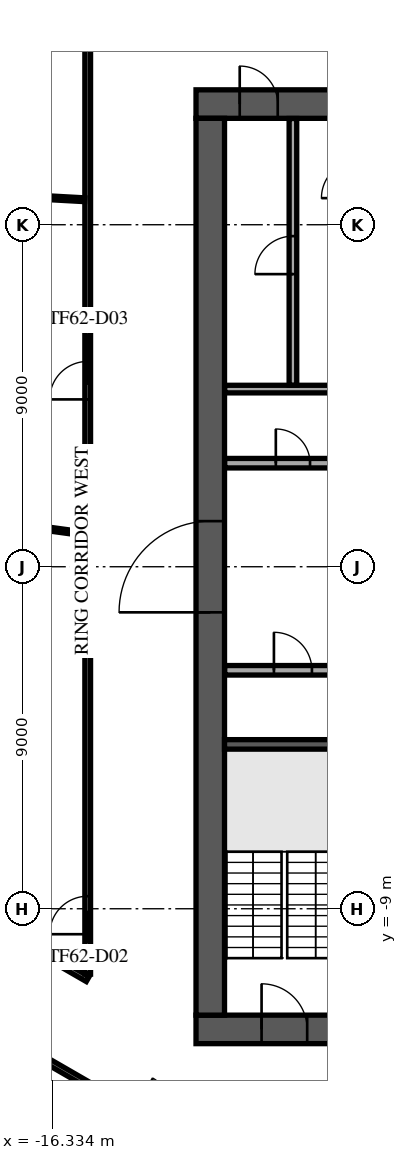
"""IFC4 building model, lengths in metres.
Left out: names, types, materials, properties, quantities, classifications, styles, units other than length and angle.
Written with IfcOpenShell. Run it as: python <this file> out.ifc"""

import sys

from ifc_helpers import new_model, si_unit, direction, frame, frame_2d, origin, place, context, subcontext, project, spatial, rectangle, extrude, element, fill, save


model = new_model("IFC4")
c1 = context("Model", 3, precision=1e-05, world=origin(), true_north=direction((0.0, 1.0)))
c2 = subcontext(c1, "Body", "Model", "MODEL_VIEW")
j1 = project(units=[si_unit("LENGTHUNIT", "METRE"), si_unit("PLANEANGLEUNIT", "RADIAN")], contexts=[c1])
p1 = place(None, origin())
s1 = spatial("IfcSite", under=j1, at=p1, CompositionType="ELEMENT")
p2 = place(p1, origin())
s2 = spatial("IfcBuilding", under=s1, at=p2, CompositionType="ELEMENT")
p3 = place(p2, frame((0.0, 0.0, 262.9)))
s3 = spatial("IfcBuildingStorey", under=s2, at=p3, CompositionType="ELEMENT", Elevation=262.9)
p4 = place(p3, frame((-12.55, 12.175, 0.0), z_axis=(0.0, 0.0, 1.0), x_axis=(1.0, 0.0, 0.0)))
e1 = element("IfcWall", 1, at=p4, inside=s3, PredefinedType="SHEAR", context=c2, shape_type="SweptSolid", body=[
    extrude(rectangle(XDim=25.1, YDim=0.75, at=frame_2d((12.55, 0.0))), origin(), (0.0, 0.0, 1.0), 3.64),
])
p5 = place(p4, frame((11.35, 0.0, 0.0)))
e2 = element("IfcOpeningElement", 2, at=p5, cuts=e1, PredefinedType="OPENING", context=c2, shape_type="SweptSolid", body=[
    extrude(rectangle(XDim=2.4, YDim=2.4, at=frame_2d((1.2, 1.2))), frame((0.0, 0.385, 0.0), z_axis=(0.0, -1.0, 0.0), x_axis=(1.0, 0.0, 0.0)), (0.0, 0.0, 1.0), 0.77),
])
p6 = place(p4, frame((22.175, 0.0, 0.0)))
e3 = element("IfcOpeningElement", 3, at=p6, cuts=e1, PredefinedType="OPENING", context=c2, shape_type="SweptSolid", body=[
    extrude(rectangle(XDim=1.2, YDim=2.1, at=frame_2d((0.6, 1.05))), frame((0.0, 0.385, 0.0), z_axis=(0.0, -1.0, 0.0), x_axis=(1.0, 0.0, 0.0)), (0.0, 0.0, 1.0), 0.77),
])
p7 = place(p4, frame((1.15, 0.0, 0.0)))
e4 = element("IfcOpeningElement", 4, at=p7, cuts=e1, PredefinedType="OPENING", context=c2, shape_type="SweptSolid", body=[
    extrude(rectangle(XDim=1.0, YDim=2.1, at=frame_2d((0.5, 1.05))), frame((0.0, 0.385, 0.0), z_axis=(0.0, -1.0, 0.0), x_axis=(1.0, 0.0, 0.0)), (0.0, 0.0, 1.0), 0.77),
])
p8 = place(p3, frame((-12.55, -12.175, 0.0), z_axis=(0.0, 0.0, 1.0), x_axis=(1.0, 0.0, 0.0)))
e5 = element("IfcWall", 5, at=p8, inside=s3, PredefinedType="SHEAR", context=c2, shape_type="SweptSolid", body=[
    extrude(rectangle(XDim=25.1, YDim=0.75, at=frame_2d((12.55, 0.0))), origin(), (0.0, 0.0, 1.0), 3.64),
])
p9 = place(p8, frame((7.45, 0.0, 0.0)))
e6 = element("IfcOpeningElement", 6, at=p9, cuts=e5, PredefinedType="OPENING", context=c2, shape_type="SweptSolid", body=[
    extrude(rectangle(XDim=2.0, YDim=2.1, at=frame_2d((1.0, 1.05))), frame((0.0, 0.385, 0.0), z_axis=(0.0, -1.0, 0.0), x_axis=(1.0, 0.0, 0.0)), (0.0, 0.0, 1.0), 0.77),
])
p10 = place(p8, frame((17.575, 0.0, 0.0)))
e7 = element("IfcOpeningElement", 7, at=p10, cuts=e5, PredefinedType="OPENING", context=c2, shape_type="SweptSolid", body=[
    extrude(rectangle(XDim=1.2, YDim=2.1, at=frame_2d((0.6, 1.05))), frame((0.0, 0.385, 0.0), z_axis=(0.0, -1.0, 0.0), x_axis=(1.0, 0.0, 0.0)), (0.0, 0.0, 1.0), 0.77),
])
p11 = place(p8, frame((1.725, 0.0, 0.0)))
e8 = element("IfcOpeningElement", 8, at=p11, cuts=e5, PredefinedType="OPENING", context=c2, shape_type="SweptSolid", body=[
    extrude(rectangle(XDim=1.2, YDim=2.1, at=frame_2d((0.6, 1.05))), frame((0.0, 0.385, 0.0), z_axis=(0.0, -1.0, 0.0), x_axis=(1.0, 0.0, 0.0)), (0.0, 0.0, 1.0), 0.77),
])
p12 = place(p8, frame((22.175, 0.0, 0.0)))
e9 = element("IfcOpeningElement", 9, at=p12, cuts=e5, PredefinedType="OPENING", context=c2, shape_type="SweptSolid", body=[
    extrude(rectangle(XDim=1.2, YDim=2.1, at=frame_2d((0.6, 1.05))), frame((0.0, 0.385, 0.0), z_axis=(0.0, -1.0, 0.0), x_axis=(1.0, 0.0, 0.0)), (0.0, 0.0, 1.0), 0.77),
])
p13 = place(p3, frame((-12.175, -11.8, 0.0), z_axis=(0.0, 0.0, 1.0), x_axis=(0.0, 1.0, 0.0)))
e10 = element("IfcWall", 10, at=p13, inside=s3, PredefinedType="SHEAR", context=c2, shape_type="SweptSolid", body=[
    extrude(rectangle(XDim=23.6, YDim=0.75, at=frame_2d((11.8, 0.0))), origin(), (0.0, 0.0, 1.0), 3.64),
])
p14 = place(p13, frame((10.6, 0.0, 0.0)))
e11 = element("IfcOpeningElement", 11, at=p14, cuts=e10, PredefinedType="OPENING", context=c2, shape_type="SweptSolid", body=[
    extrude(rectangle(XDim=2.4, YDim=2.4, at=frame_2d((1.2, 1.2))), frame((0.0, 0.385, 0.0), z_axis=(0.0, -1.0, 0.0), x_axis=(1.0, 0.0, 0.0)), (0.0, 0.0, 1.0), 0.77),
])
p15 = place(p3, frame((-8.65, -4.675, 0.0), z_axis=(0.0, 0.0, 1.0), x_axis=(-1.0, 0.0, 0.0)))
e12 = element("IfcWall", 12, at=p15, inside=s3, PredefinedType="SOLIDWALL", context=c2, shape_type="SweptSolid", body=[
    extrude(rectangle(XDim=3.15, YDim=0.25, at=frame_2d((1.575, 0.0))), origin(), (0.0, 0.0, 1.0), 3.64),
])
p16 = place(p3, frame((-11.795, -2.725, 0.0), z_axis=(0.0, 0.0, 1.0), x_axis=(1.0, 0.0, 0.0)))
e13 = element("IfcWall", 13, at=p16, inside=s3, PredefinedType="PARTITIONING", context=c2, shape_type="SweptSolid", body=[
    extrude(rectangle(XDim=14.415, YDim=0.25, at=frame_2d((7.208, 0.0))), origin(), (0.0, 0.0, 1.0), 3.64),
])
p17 = place(p16, frame((1.295, 0.0, 0.0)))
e14 = element("IfcOpeningElement", 14, at=p17, cuts=e13, PredefinedType="OPENING", context=c2, shape_type="SweptSolid", body=[
    extrude(rectangle(XDim=1.0, YDim=2.1, at=frame_2d((0.5, 1.05))), frame((0.0, 0.135, 0.0), z_axis=(0.0, -1.0, 0.0), x_axis=(1.0, 0.0, 0.0)), (0.0, 0.0, 1.0), 0.27),
])
p18 = place(p16, frame((4.42, 0.0, 0.0)))
e15 = element("IfcOpeningElement", 15, at=p18, cuts=e13, PredefinedType="OPENING", context=c2, shape_type="SweptSolid", body=[
    extrude(rectangle(XDim=1.0, YDim=2.1, at=frame_2d((0.5, 1.05))), frame((0.0, 0.135, 0.0), z_axis=(0.0, -1.0, 0.0), x_axis=(1.0, 0.0, 0.0)), (0.0, 0.0, 1.0), 0.27),
])
p19 = place(p16, frame((9.92, 0.0, 0.0)))
e16 = element("IfcOpeningElement", 16, at=p19, cuts=e13, PredefinedType="OPENING", context=c2, shape_type="SweptSolid", body=[
    extrude(rectangle(XDim=1.0, YDim=2.1, at=frame_2d((0.5, 1.05))), frame((0.0, 0.135, 0.0), z_axis=(0.0, -1.0, 0.0), x_axis=(1.0, 0.0, 0.0)), (0.0, 0.0, 1.0), 0.27),
])
p20 = place(p3, frame((-11.795, 2.725, 0.0), z_axis=(0.0, 0.0, 1.0), x_axis=(1.0, 0.0, 0.0)))
e17 = element("IfcWall", 17, at=p20, inside=s3, PredefinedType="PARTITIONING", context=c2, shape_type="SweptSolid", body=[
    extrude(rectangle(XDim=23.59, YDim=0.25, at=frame_2d((11.795, 0.0))), origin(), (0.0, 0.0, 1.0), 3.64),
])
p21 = place(p20, frame((21.345, 0.0, 0.0)))
e18 = element("IfcOpeningElement", 18, at=p21, cuts=e17, PredefinedType="OPENING", context=c2, shape_type="SweptSolid", body=[
    extrude(rectangle(XDim=0.9, YDim=2.1, at=frame_2d((0.45, 1.05))), frame((0.0, 0.135, 0.0), z_axis=(0.0, -1.0, 0.0), x_axis=(1.0, 0.0, 0.0)), (0.0, 0.0, 1.0), 0.27),
])
p22 = place(p20, frame((1.345, 0.0, 0.0)))
e19 = element("IfcOpeningElement", 19, at=p22, cuts=e17, PredefinedType="OPENING", context=c2, shape_type="SweptSolid", body=[
    extrude(rectangle(XDim=0.9, YDim=2.1, at=frame_2d((0.45, 1.05))), frame((0.0, 0.135, 0.0), z_axis=(0.0, -1.0, 0.0), x_axis=(1.0, 0.0, 0.0)), (0.0, 0.0, 1.0), 0.27),
])
p23 = place(p20, frame((4.42, 0.0, 0.0)))
e20 = element("IfcOpeningElement", 20, at=p23, cuts=e17, PredefinedType="OPENING", context=c2, shape_type="SweptSolid", body=[
    extrude(rectangle(XDim=1.0, YDim=2.1, at=frame_2d((0.5, 1.05))), frame((0.0, 0.135, 0.0), z_axis=(0.0, -1.0, 0.0), x_axis=(1.0, 0.0, 0.0)), (0.0, 0.0, 1.0), 0.27),
])
p24 = place(p20, frame((9.82, 0.0, 0.0)))
e21 = element("IfcOpeningElement", 21, at=p24, cuts=e17, PredefinedType="OPENING", context=c2, shape_type="SweptSolid", body=[
    extrude(rectangle(XDim=1.2, YDim=2.1, at=frame_2d((0.6, 1.05))), frame((0.0, 0.135, 0.0), z_axis=(0.0, -1.0, 0.0), x_axis=(1.0, 0.0, 0.0)), (0.0, 0.0, 1.0), 0.27),
])
p25 = place(p3, frame((-11.795, 4.675, 0.0), z_axis=(0.0, 0.0, 1.0), x_axis=(1.0, 0.0, 0.0)))
e22 = element("IfcWall", 22, at=p25, inside=s3, PredefinedType="PARTITIONING", context=c2, shape_type="SweptSolid", body=[
    extrude(rectangle(XDim=3.645, YDim=0.2, at=frame_2d((1.823, 0.0))), origin(), (0.0, 0.0, 1.0), 3.64),
])
p26 = place(p3, frame((-10.0, 4.78, 0.0), z_axis=(0.0, 0.0, 1.0), x_axis=(0.0, 1.0, 0.0)))
e23 = element("IfcWall", 23, at=p26, inside=s3, PredefinedType="PARTITIONING", context=c2, shape_type="SweptSolid", body=[
    extrude(rectangle(XDim=7.015, YDim=0.2, at=frame_2d((3.507, 0.0))), origin(), (0.0, 0.0, 1.0), 3.64),
])
p27 = place(p26, frame((2.92, 0.0, 0.0)))
e24 = element("IfcOpeningElement", 24, at=p27, cuts=e23, PredefinedType="OPENING", context=c2, shape_type="SweptSolid", body=[
    extrude(rectangle(XDim=1.0, YDim=2.1, at=frame_2d((0.5, 1.05))), frame((0.0, 0.11, 0.0), z_axis=(0.0, -1.0, 0.0), x_axis=(1.0, 0.0, 0.0)), (0.0, 0.0, 1.0), 0.22),
])
p28 = place(p3, frame((-8.015, 32.917, 0.0), z_axis=(0.0, 0.0, 1.0), x_axis=(-0.500001675963, -0.866024436165, 0.0)))
e25 = element("IfcWall", 25, at=p28, inside=s3, PredefinedType="STANDARD", context=c2, shape_type="SweptSolid", body=[
    extrude(rectangle(XDim=48.843, YDim=0.6, at=frame_2d((24.421, 0.0))), origin(), (0.0, 0.0, 1.0), 3.64),
])
p29 = place(p28, frame((1.22, 0.0, 0.9)))
e26 = element("IfcOpeningElement", 26, at=p29, cuts=e25, PredefinedType="OPENING", context=c2, shape_type="SweptSolid", body=[
    extrude(rectangle(XDim=2.0, YDim=2.1, at=frame_2d((1.0, 1.05))), frame((0.0, 0.31, 0.0), z_axis=(0.0, -1.0, 0.0), x_axis=(1.0, 0.0, 0.0)), (0.0, 0.0, 1.0), 0.62),
])
p30 = place(p28, frame((5.66, 0.0, 0.9)))
e27 = element("IfcOpeningElement", 27, at=p30, cuts=e25, PredefinedType="OPENING", context=c2, shape_type="SweptSolid", body=[
    extrude(rectangle(XDim=2.0, YDim=2.1, at=frame_2d((1.0, 1.05))), frame((0.0, 0.31, 0.0), z_axis=(0.0, -1.0, 0.0), x_axis=(1.0, 0.0, 0.0)), (0.0, 0.0, 1.0), 0.62),
])
p31 = place(p28, frame((10.101, 0.0, 0.9)))
e28 = element("IfcOpeningElement", 28, at=p31, cuts=e25, PredefinedType="OPENING", context=c2, shape_type="SweptSolid", body=[
    extrude(rectangle(XDim=2.0, YDim=2.1, at=frame_2d((1.0, 1.05))), frame((0.0, 0.31, 0.0), z_axis=(0.0, -1.0, 0.0), x_axis=(1.0, 0.0, 0.0)), (0.0, 0.0, 1.0), 0.62),
])
p32 = place(p28, frame((14.541, 0.0, 0.9)))
e29 = element("IfcOpeningElement", 29, at=p32, cuts=e25, PredefinedType="OPENING", context=c2, shape_type="SweptSolid", body=[
    extrude(rectangle(XDim=2.0, YDim=2.1, at=frame_2d((1.0, 1.05))), frame((0.0, 0.31, 0.0), z_axis=(0.0, -1.0, 0.0), x_axis=(1.0, 0.0, 0.0)), (0.0, 0.0, 1.0), 0.62),
])
p33 = place(p28, frame((18.981, 0.0, 0.9)))
e30 = element("IfcOpeningElement", 30, at=p33, cuts=e25, PredefinedType="OPENING", context=c2, shape_type="SweptSolid", body=[
    extrude(rectangle(XDim=2.0, YDim=2.1, at=frame_2d((1.0, 1.05))), frame((0.0, 0.31, 0.0), z_axis=(0.0, -1.0, 0.0), x_axis=(1.0, 0.0, 0.0)), (0.0, 0.0, 1.0), 0.62),
])
p34 = place(p28, frame((23.422, 0.0, 0.9)))
e31 = element("IfcOpeningElement", 31, at=p34, cuts=e25, PredefinedType="OPENING", context=c2, shape_type="SweptSolid", body=[
    extrude(rectangle(XDim=2.0, YDim=2.1, at=frame_2d((1.0, 1.05))), frame((0.0, 0.31, 0.0), z_axis=(0.0, -1.0, 0.0), x_axis=(1.0, 0.0, 0.0)), (0.0, 0.0, 1.0), 0.62),
])
p35 = place(p28, frame((27.862, 0.0, 0.9)))
e32 = element("IfcOpeningElement", 32, at=p35, cuts=e25, PredefinedType="OPENING", context=c2, shape_type="SweptSolid", body=[
    extrude(rectangle(XDim=2.0, YDim=2.1, at=frame_2d((1.0, 1.05))), frame((0.0, 0.31, 0.0), z_axis=(0.0, -1.0, 0.0), x_axis=(1.0, 0.0, 0.0)), (0.0, 0.0, 1.0), 0.62),
])
p36 = place(p28, frame((32.302, 0.0, 0.9)))
e33 = element("IfcOpeningElement", 33, at=p36, cuts=e25, PredefinedType="OPENING", context=c2, shape_type="SweptSolid", body=[
    extrude(rectangle(XDim=2.0, YDim=2.1, at=frame_2d((1.0, 1.05))), frame((0.0, 0.31, 0.0), z_axis=(0.0, -1.0, 0.0), x_axis=(1.0, 0.0, 0.0)), (0.0, 0.0, 1.0), 0.62),
])
p37 = place(p28, frame((36.742, 0.0, 0.9)))
e34 = element("IfcOpeningElement", 34, at=p37, cuts=e25, PredefinedType="OPENING", context=c2, shape_type="SweptSolid", body=[
    extrude(rectangle(XDim=2.0, YDim=2.1, at=frame_2d((1.0, 1.05))), frame((0.0, 0.31, 0.0), z_axis=(0.0, -1.0, 0.0), x_axis=(1.0, 0.0, 0.0)), (0.0, 0.0, 1.0), 0.62),
])
p38 = place(p28, frame((41.183, 0.0, 0.9)))
e35 = element("IfcOpeningElement", 35, at=p38, cuts=e25, PredefinedType="OPENING", context=c2, shape_type="SweptSolid", body=[
    extrude(rectangle(XDim=2.0, YDim=2.1, at=frame_2d((1.0, 1.05))), frame((0.0, 0.31, 0.0), z_axis=(0.0, -1.0, 0.0), x_axis=(1.0, 0.0, 0.0)), (0.0, 0.0, 1.0), 0.62),
])
p39 = place(p28, frame((45.623, 0.0, 0.9)))
e36 = element("IfcOpeningElement", 36, at=p39, cuts=e25, PredefinedType="OPENING", context=c2, shape_type="SweptSolid", body=[
    extrude(rectangle(XDim=2.0, YDim=2.1, at=frame_2d((1.0, 1.05))), frame((0.0, 0.31, 0.0), z_axis=(0.0, -1.0, 0.0), x_axis=(1.0, 0.0, 0.0)), (0.0, 0.0, 1.0), 0.62),
])
p40 = place(p3, frame((-26.744, -7.073, 0.0), z_axis=(0.0, 0.0, 1.0), x_axis=(0.866020890374, -0.500007817374, 0.0)))
e37 = element("IfcWall", 37, at=p40, inside=s3, PredefinedType="PARTITIONING", context=c2, shape_type="SweptSolid", body=[
    extrude(rectangle(XDim=39.324, YDim=0.15, at=frame_2d((19.662, 0.0))), origin(), (0.0, 0.0, 1.0), 3.04),
])
p41 = place(p40, frame((14.505, 0.0, 0.0)))
e38 = element("IfcOpeningElement", 38, at=p41, cuts=e37, PredefinedType="OPENING", context=c2, shape_type="SweptSolid", body=[
    extrude(rectangle(XDim=1.0, YDim=2.1, at=frame_2d((0.5, 1.05))), frame((0.0, 0.085, 0.0), z_axis=(0.0, -1.0, 0.0), x_axis=(1.0, 0.0, 0.0)), (0.0, 0.0, 1.0), 0.17),
])
p42 = place(p40, frame((22.632, 0.0, 0.0)))
e39 = element("IfcOpeningElement", 39, at=p42, cuts=e37, PredefinedType="OPENING", context=c2, shape_type="SweptSolid", body=[
    extrude(rectangle(XDim=1.0, YDim=2.1, at=frame_2d((0.5, 1.05))), frame((0.0, 0.085, 0.0), z_axis=(0.0, -1.0, 0.0), x_axis=(1.0, 0.0, 0.0)), (0.0, 0.0, 1.0), 0.17),
])
p43 = place(p40, frame((36.852, 0.0, 0.0)))
e40 = element("IfcOpeningElement", 40, at=p43, cuts=e37, PredefinedType="OPENING", context=c2, shape_type="SweptSolid", body=[
    extrude(rectangle(XDim=1.8, YDim=2.1, at=frame_2d((0.9, 1.05))), frame((0.0, 0.085, 0.0), z_axis=(0.0, -1.0, 0.0), x_axis=(1.0, 0.0, 0.0)), (0.0, 0.0, 1.0), 0.17),
])
p44 = place(p40, frame((29.852, 0.0, 0.0)))
e41 = element("IfcOpeningElement", 41, at=p44, cuts=e37, PredefinedType="OPENING", context=c2, shape_type="SweptSolid", body=[
    extrude(rectangle(XDim=1.0, YDim=2.1, at=frame_2d((0.5, 1.05))), frame((0.0, 0.085, 0.0), z_axis=(0.0, -1.0, 0.0), x_axis=(1.0, 0.0, 0.0)), (0.0, 0.0, 1.0), 0.17),
])
p45 = place(p3, frame((-25.544, -4.993, 0.0), z_axis=(0.0, 0.0, 1.0), x_axis=(0.865988432642, -0.50006403043, 0.0)))
e42 = element("IfcWall", 42, at=p45, inside=s3, PredefinedType="PARTITIONING", context=c2, shape_type="SweptSolid", body=[
    extrude(rectangle(XDim=11.714, YDim=0.15, at=frame_2d((5.857, 0.0))), origin(), (0.0, 0.0, 1.0), 3.04),
])
p46 = place(p45, frame((4.8, 0.0, 0.0)))
e43 = element("IfcOpeningElement", 43, at=p46, cuts=e42, PredefinedType="OPENING", context=c2, shape_type="SweptSolid", body=[
    extrude(rectangle(XDim=1.8, YDim=2.1, at=frame_2d((0.9, 1.05))), frame((0.0, 0.085, 0.0), z_axis=(0.0, -1.0, 0.0), x_axis=(1.0, 0.0, 0.0)), (0.0, 0.0, 1.0), 0.17),
])
p47 = place(p3, frame((-15.4, -10.72, 0.0), z_axis=(0.0, 0.0, 1.0), x_axis=(0.0, 1.0, 0.0)))
e44 = element("IfcWall", 44, at=p47, inside=s3, PredefinedType="PARTITIONING", context=c2, shape_type="SweptSolid", body=[
    extrude(rectangle(XDim=26.12, YDim=0.15, at=frame_2d((13.06, 0.0))), origin(), (0.0, 0.0, 1.0), 3.24),
])
p48 = place(p47, frame((1.05, 0.0, 0.0)))
e45 = element("IfcOpeningElement", 45, at=p48, cuts=e44, PredefinedType="OPENING", context=c2, shape_type="SweptSolid", body=[
    extrude(rectangle(XDim=1.0, YDim=2.1, at=frame_2d((0.5, 1.05))), frame((0.0, 0.085, 0.0), z_axis=(0.0, -1.0, 0.0), x_axis=(1.0, 0.0, 0.0)), (0.0, 0.0, 1.0), 0.17),
])
p49 = place(p47, frame((15.124, 0.0, 0.0)))
e46 = element("IfcOpeningElement", 46, at=p49, cuts=e44, PredefinedType="OPENING", context=c2, shape_type="SweptSolid", body=[
    extrude(rectangle(XDim=1.0, YDim=2.1, at=frame_2d((0.5, 1.05))), frame((0.0, 0.085, 0.0), z_axis=(0.0, -1.0, 0.0), x_axis=(1.0, 0.0, 0.0)), (0.0, 0.0, 1.0), 0.17),
])
p50 = place(p3, frame((-25.391, 2.217, 0.0), z_axis=(0.0, 0.0, 1.0), x_axis=(0.990810103631, -0.135260262244, 0.0)))
e47 = element("IfcWall", 47, at=p50, inside=s3, PredefinedType="PARTITIONING", context=c2, shape_type="SweptSolid", body=[
    extrude(rectangle(XDim=10.001, YDim=0.1, at=frame_2d((5.0, 0.0))), origin(), (0.0, 0.0, 1.0), 3.04),
])
p51 = place(p3, frame((-20.922, 9.959, 0.0), z_axis=(0.0, 0.0, 1.0), x_axis=(0.998469707991, -0.055301376328, 0.0)))
e48 = element("IfcWall", 48, at=p51, inside=s3, PredefinedType="PARTITIONING", context=c2, shape_type="SweptSolid", body=[
    extrude(rectangle(XDim=5.452, YDim=0.1, at=frame_2d((2.726, 0.0))), origin(), (0.0, 0.0, 1.0), 3.04),
])
p52 = place(p7, origin())
e49 = element("IfcDoor", 49, at=p52, inside=s3, OperationType="SINGLE_SWING_LEFT", PredefinedType="DOOR", context=c2, shape_type="SweptSolid", body=[
    extrude(rectangle(XDim=1.0, YDim=2.1, at=frame_2d((0.5, 1.05))), frame((0.0, 0.025, 0.0), z_axis=(0.0, -1.0, 0.0), x_axis=(1.0, 0.0, 0.0)), (0.0, 0.0, 1.0), 0.05),
])
fill(e4, e49)
p53 = place(p11, origin())
e50 = element("IfcDoor", 50, at=p53, inside=s3, OperationType="SINGLE_SWING_LEFT", PredefinedType="DOOR", context=c2, shape_type="SweptSolid", body=[
    extrude(rectangle(XDim=1.2, YDim=2.1, at=frame_2d((0.6, 1.05))), frame((0.0, 0.025, 0.0), z_axis=(0.0, -1.0, 0.0), x_axis=(1.0, 0.0, 0.0)), (0.0, 0.0, 1.0), 0.05),
])
fill(e8, e50)
p54 = place(p14, origin())
e51 = element("IfcDoor", 51, at=p54, inside=s3, OperationType="SINGLE_SWING_LEFT", PredefinedType="DOOR", context=c2, shape_type="SweptSolid", body=[
    extrude(rectangle(XDim=2.4, YDim=2.4, at=frame_2d((1.2, 1.2))), frame((0.0, 0.025, 0.0), z_axis=(0.0, -1.0, 0.0), x_axis=(1.0, 0.0, 0.0)), (0.0, 0.0, 1.0), 0.05),
])
fill(e11, e51)
p55 = place(p17, origin())
e52 = element("IfcDoor", 52, at=p55, inside=s3, OperationType="SINGLE_SWING_LEFT", PredefinedType="DOOR", context=c2, shape_type="SweptSolid", body=[
    extrude(rectangle(XDim=1.0, YDim=2.1, at=frame_2d((0.5, 1.05))), frame((0.0, 0.025, 0.0), z_axis=(0.0, -1.0, 0.0), x_axis=(1.0, 0.0, 0.0)), (0.0, 0.0, 1.0), 0.05),
])
fill(e14, e52)
p56 = place(p22, origin())
e53 = element("IfcDoor", 53, at=p56, inside=s3, OperationType="SINGLE_SWING_LEFT", PredefinedType="DOOR", context=c2, shape_type="SweptSolid", body=[
    extrude(rectangle(XDim=0.9, YDim=2.1, at=frame_2d((0.45, 1.05))), frame((0.0, 0.025, 0.0), z_axis=(0.0, -1.0, 0.0), x_axis=(1.0, 0.0, 0.0)), (0.0, 0.0, 1.0), 0.05),
])
fill(e19, e53)
p57 = place(p27, origin())
e54 = element("IfcDoor", 54, at=p57, inside=s3, OperationType="SINGLE_SWING_LEFT", PredefinedType="DOOR", context=c2, shape_type="SweptSolid", body=[
    extrude(rectangle(XDim=1.0, YDim=2.1, at=frame_2d((0.5, 1.05))), frame((0.0, 0.025, 0.0), z_axis=(0.0, -1.0, 0.0), x_axis=(1.0, 0.0, 0.0)), (0.0, 0.0, 1.0), 0.05),
])
fill(e24, e54)
p58 = place(p48, origin())
e55 = element("IfcDoor", 55, at=p58, inside=s3, OperationType="SINGLE_SWING_LEFT", PredefinedType="DOOR", context=c2, shape_type="SweptSolid", body=[
    extrude(rectangle(XDim=1.0, YDim=2.1, at=frame_2d((0.5, 1.05))), frame((0.0, 0.025, 0.0), z_axis=(0.0, -1.0, 0.0), x_axis=(1.0, 0.0, 0.0)), (0.0, 0.0, 1.0), 0.05),
])
fill(e45, e55)
p59 = place(p49, origin())
e56 = element("IfcDoor", 56, at=p59, inside=s3, OperationType="SINGLE_SWING_RIGHT", PredefinedType="DOOR", context=c2, shape_type="SweptSolid", body=[
    extrude(rectangle(XDim=1.0, YDim=2.1, at=frame_2d((0.5, 1.05))), frame((0.0, 0.025, 0.0), z_axis=(0.0, -1.0, 0.0), x_axis=(1.0, 0.0, 0.0)), (0.0, 0.0, 1.0), 0.05),
])
fill(e46, e56)
save(model, sys.argv[1])
